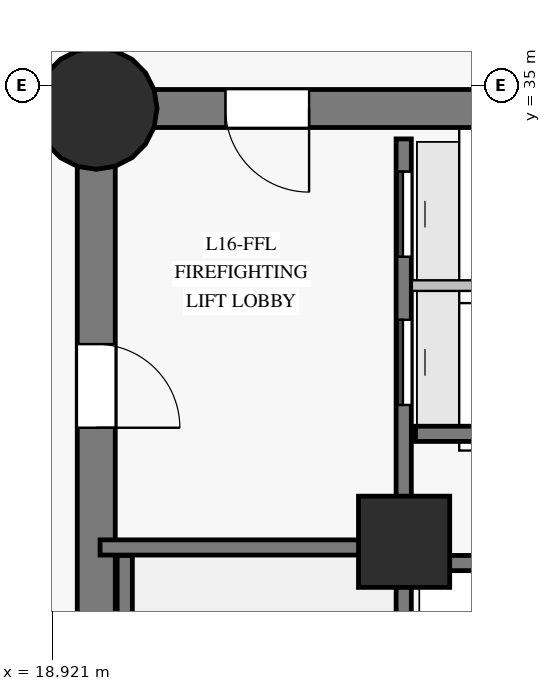
"""IFC4 building model, lengths in metres.
Left out: names, types, materials, properties, quantities, classifications, styles, units other than length and angle.
Written with IfcOpenShell. Run it as: python <this file> out.ifc"""

import sys

from ifc_helpers import new_model, si_unit, direction, frame, frame_2d, origin, origin_with_axes, origin_2d, place, context, subcontext, project, spatial, rectangle, circle, extrude, source, transform, mapped, element, fill, save


model = new_model("IFC4")
c1 = context("Model", 3, precision=1e-05, world=origin(), true_north=direction((0.0, 1.0)))
c2 = subcontext(c1, "Body", "Model", "MODEL_VIEW")
j1 = project(units=[si_unit("LENGTHUNIT", "METRE"), si_unit("PLANEANGLEUNIT", "RADIAN")], contexts=[c1])
p1 = place(None, origin())
s1 = spatial("IfcSite", under=j1, at=p1, CompositionType="ELEMENT")
p2 = place(p1, origin())
s2 = spatial("IfcBuilding", under=s1, at=p2, CompositionType="ELEMENT")
p3 = place(p2, frame((0.0, 0.0, 62.5)))
s3 = spatial("IfcBuildingStorey", under=s2, at=p3, CompositionType="ELEMENT", Elevation=62.5)
p4 = place(p3, frame((26.55, 34.7, 0.0), z_axis=(0.0, 0.0, 1.0), x_axis=(-1.0, 0.0, 0.0)))
e1 = element("IfcWall", 1, at=p4, inside=s3, PredefinedType="SHEAR", context=c2, shape_type="SweptSolid", body=[
    extrude(rectangle(XDim=7.05, YDim=0.5, at=frame_2d((3.525, 0.0))), origin(), (0.0, 0.0, 1.0), 3.35),
])
p5 = place(p4, frame((4.25, 0.0, 0.0)))
e2 = element("IfcOpeningElement", 2, at=p5, cuts=e1, PredefinedType="OPENING", context=c2, shape_type="SweptSolid", body=[
    extrude(rectangle(XDim=1.1, YDim=2.15, at=frame_2d((0.55, 1.075))), frame((0.0, 0.26, 0.0), z_axis=(0.0, -1.0, 0.0), x_axis=(1.0, 0.0, 0.0)), (0.0, 0.0, 1.0), 0.52),
])
p6 = place(p3, frame((19.5, 34.7, 0.0), z_axis=(0.0, 0.0, 1.0), x_axis=(0.0, -1.0, 0.0)))
e3 = element("IfcWall", 3, at=p6, inside=s3, PredefinedType="SHEAR", context=c2, shape_type="SweptSolid", body=[
    extrude(rectangle(XDim=16.4, YDim=0.5, at=frame_2d((8.2, 0.0))), origin(), (0.0, 0.0, 1.0), 3.35),
])
p7 = place(p6, frame((3.1, 0.0, 0.0)))
e4 = element("IfcOpeningElement", 4, at=p7, cuts=e3, PredefinedType="OPENING", context=c2, shape_type="SweptSolid", body=[
    extrude(rectangle(XDim=1.1, YDim=2.15, at=frame_2d((0.55, 1.075))), frame((0.0, 0.26, 0.0), z_axis=(0.0, -1.0, 0.0), x_axis=(1.0, 0.0, 0.0)), (0.0, 0.0, 1.0), 0.52),
])
m1 = source(origin_with_axes(), c2, "Body", "SweptSolid", [
    extrude(circle(Radius=0.8, at=origin_2d()), origin(), (0.0, 0.0, 1.0), 3.6),
])
p8 = place(p3, frame((19.5, 34.7, 0.0), z_axis=(0.0, 0.0, 1.0), x_axis=(1.0, 0.0, 0.0)))
e5 = element("IfcColumn", 5, at=p8, inside=s3, PredefinedType="COLUMN", context=c2, shape_type="MappedRepresentation", body=[
    mapped(m1, transform((0.0, 0.0, 0.0), scale=1.0)),
])
m2 = source(origin_with_axes(), c2, "Body", "SweptSolid", [
    extrude(rectangle(XDim=1.2, YDim=1.2, at=origin_2d()), origin(), (0.0, 0.0, 1.0), 3.6),
])
p9 = place(p3, frame((23.55, 29.0, 0.0), z_axis=(0.0, 0.0, 1.0), x_axis=(1.0, 0.0, 0.0)))
e6 = element("IfcColumn", 6, at=p9, inside=s3, PredefinedType="COLUMN", context=c2, shape_type="MappedRepresentation", body=[
    mapped(m2, transform((0.0, 0.0, 0.0), scale=1.0)),
])
p10 = place(p3, frame((23.545, 18.7, 0.0), z_axis=(0.0, 0.0, 1.0), x_axis=(0.0, 1.0, 0.0)))
e7 = element("IfcWall", 7, at=p10, inside=s3, PredefinedType="SHEAR", context=c2, shape_type="SweptSolid", body=[
    extrude(rectangle(XDim=15.6, YDim=0.2, at=frame_2d((7.8, 0.0))), origin(), (0.0, 0.0, 1.0), 3.35),
])
p11 = place(p10, frame((2.75, 0.0, 0.0)))
e8 = element("IfcOpeningElement", 8, at=p11, cuts=e7, PredefinedType="OPENING", context=c2, shape_type="SweptSolid", body=[
    extrude(rectangle(XDim=1.15, YDim=2.15, at=frame_2d((0.575, 1.075))), frame((0.0, 0.11, 0.0), z_axis=(0.0, -1.0, 0.0), x_axis=(1.0, 0.0, 0.0)), (0.0, 0.0, 1.0), 0.22),
])
p12 = place(p10, frame((0.14, 0.0, 0.0)))
e9 = element("IfcOpeningElement", 9, at=p12, cuts=e7, PredefinedType="OPENING", context=c2, shape_type="SweptSolid", body=[
    extrude(rectangle(XDim=0.88, YDim=2.1, at=frame_2d((0.44, 1.05))), frame((0.0, 0.11, 0.0), z_axis=(0.0, -1.0, 0.0), x_axis=(1.0, 0.0, 0.0)), (0.0, 0.0, 1.0), 0.22),
])
p13 = place(p10, frame((1.36, 0.0, 0.0)))
e10 = element("IfcOpeningElement", 10, at=p13, cuts=e7, PredefinedType="OPENING", context=c2, shape_type="SweptSolid", body=[
    extrude(rectangle(XDim=0.88, YDim=2.1, at=frame_2d((0.44, 1.05))), frame((0.0, 0.11, 0.0), z_axis=(0.0, -1.0, 0.0), x_axis=(1.0, 0.0, 0.0)), (0.0, 0.0, 1.0), 0.22),
])
p14 = place(p10, frame((12.1, 0.0, 0.0)))
e11 = element("IfcOpeningElement", 11, at=p14, cuts=e7, PredefinedType="OPENING", context=c2, shape_type="SweptSolid", body=[
    extrude(rectangle(XDim=1.12, YDim=2.15, at=frame_2d((0.56, 1.075))), frame((0.0, 0.11, 0.0), z_axis=(0.0, -1.0, 0.0), x_axis=(1.0, 0.0, 0.0)), (0.0, 0.0, 1.0), 0.22),
])
p15 = place(p10, frame((14.05, 0.0, 0.0)))
e12 = element("IfcOpeningElement", 12, at=p15, cuts=e7, PredefinedType="OPENING", context=c2, shape_type="SweptSolid", body=[
    extrude(rectangle(XDim=1.12, YDim=2.15, at=frame_2d((0.56, 1.075))), frame((0.0, 0.11, 0.0), z_axis=(0.0, -1.0, 0.0), x_axis=(1.0, 0.0, 0.0)), (0.0, 0.0, 1.0), 0.22),
])
p16 = place(p3, frame((23.7, 28.72, 0.0), z_axis=(0.0, 0.0, 1.0), x_axis=(1.0, 0.0, 0.0)))
e13 = element("IfcWall", 13, at=p16, inside=s3, PredefinedType="SHEAR", context=c2, shape_type="SweptSolid", body=[
    extrude(rectangle(XDim=9.6, YDim=0.2, at=frame_2d((4.8, 0.0))), origin(), (0.0, 0.0, 1.0), 3.35),
])
p17 = place(p3, frame((19.875, 21.32, 0.0), z_axis=(0.0, 0.0, 1.0), x_axis=(0.0, 1.0, 0.0)))
e14 = element("IfcWall", 14, at=p17, inside=s3, PredefinedType="SHEAR", context=c2, shape_type="SweptSolid", body=[
    extrude(rectangle(XDim=7.5, YDim=0.2, at=frame_2d((3.75, 0.0))), origin(), (0.0, 0.0, 1.0), 3.35),
])
p18 = place(p3, frame((19.55, 28.925, 0.0), z_axis=(0.0, 0.0, 1.0), x_axis=(1.0, 0.0, 0.0)))
e15 = element("IfcWall", 15, at=p18, inside=s3, PredefinedType="SHEAR", context=c2, shape_type="SweptSolid", body=[
    extrude(rectangle(XDim=3.995, YDim=0.2, at=frame_2d((1.998, 0.0))), origin(), (0.0, 0.0, 1.0), 3.35),
])
p19 = place(p3, frame((23.7, 30.42, 0.0), z_axis=(0.0, 0.0, 1.0), x_axis=(1.0, 0.0, 0.0)))
e16 = element("IfcWall", 16, at=p19, inside=s3, PredefinedType="SHEAR", context=c2, shape_type="SweptSolid", body=[
    extrude(rectangle(XDim=2.78, YDim=0.2, at=frame_2d((1.39, 0.0))), origin(), (0.0, 0.0, 1.0), 3.35),
])
p20 = place(p3, frame((23.652, 32.37, 0.0), z_axis=(0.0, 0.0, 1.0), x_axis=(1.0, 0.0, 0.0)))
e17 = element("IfcWall", 17, at=p20, inside=s3, PredefinedType="PARTITIONING", context=c2, shape_type="SweptSolid", body=[
    extrude(rectangle(XDim=2.828, YDim=0.14, at=frame_2d((1.414, 0.0))), origin(), (0.0, 0.0, 1.0), 3.35),
])
m3 = source(origin_with_axes(), c2, "Body", "SweptSolid", [
    extrude(rectangle(XDim=1.1, YDim=2.15, at=frame_2d((0.55, 1.075))), frame((0.0, 0.025, 0.0), z_axis=(0.0, -1.0, 0.0), x_axis=(1.0, 0.0, 0.0)), (0.0, 0.0, 1.0), 0.05),
])
p21 = place(p5, origin())
e18 = element("IfcDoor", 18, at=p21, inside=s3, OperationType="SINGLE_SWING_LEFT", PredefinedType="DOOR", context=c2, shape_type="MappedRepresentation", body=[
    mapped(m3, transform((0.0, 0.0, 0.0), scale=1.0)),
])
fill(e2, e18)
p22 = place(p7, origin())
e19 = element("IfcDoor", 19, at=p22, inside=s3, OperationType="SINGLE_SWING_RIGHT", PredefinedType="DOOR", context=c2, shape_type="MappedRepresentation", body=[
    mapped(m3, transform((0.0, 0.0, 0.0), scale=1.0)),
])
fill(e4, e19)
m4 = source(origin_with_axes(), c2, "Body", "SweptSolid", [
    extrude(rectangle(XDim=1.12, YDim=2.15, at=frame_2d((0.56, 1.075))), frame((0.0, 0.025, 0.0), z_axis=(0.0, -1.0, 0.0), x_axis=(1.0, 0.0, 0.0)), (0.0, 0.0, 1.0), 0.05),
])
p23 = place(p14, origin())
e20 = element("IfcDoor", 20, at=p23, inside=s3, OperationType="SLIDING_TO_LEFT", PredefinedType="DOOR", context=c2, shape_type="MappedRepresentation", body=[
    mapped(m4, transform((0.0, 0.0, 0.0), scale=1.0)),
])
fill(e11, e20)
p24 = place(p15, origin())
e21 = element("IfcDoor", 21, at=p24, inside=s3, OperationType="SLIDING_TO_RIGHT", PredefinedType="DOOR", context=c2, shape_type="MappedRepresentation", body=[
    mapped(m4, transform((0.0, 0.0, 0.0), scale=1.0)),
])
fill(e12, e21)
save(model, sys.argv[1])
